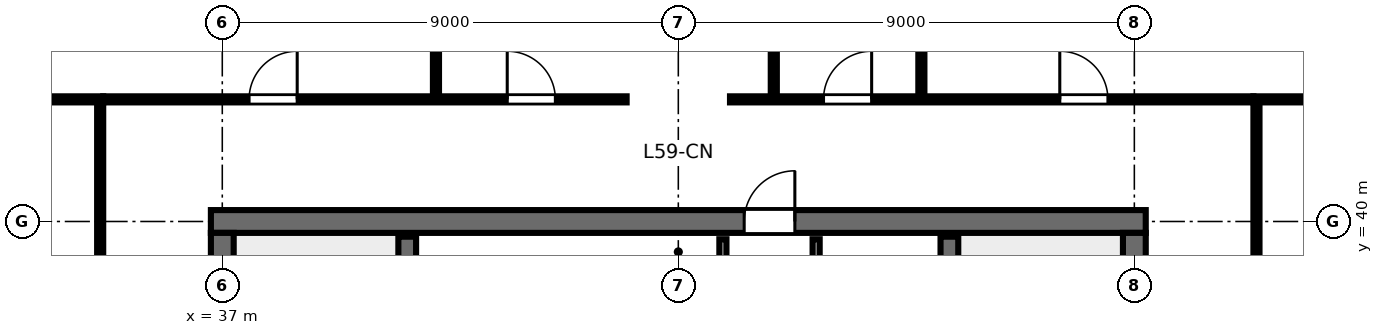
"""IFC4 building model, lengths in metres.
Left out: names, types, materials, properties, quantities, classifications, styles, units other than length and angle.
Written with IfcOpenShell. Run it as: python <this file> out.ifc"""

import sys

from ifc_helpers import new_model, si_unit, direction, frame, frame_2d, origin, place, context, subcontext, project, spatial, rectangle, extrude, element, fill, save


model = new_model("IFC4")
c1 = context("Model", 3, precision=1e-05, world=origin(), true_north=direction((0.0, 1.0)))
c2 = subcontext(c1, "Body", "Model", "MODEL_VIEW")
j1 = project(units=[si_unit("LENGTHUNIT", "METRE"), si_unit("PLANEANGLEUNIT", "RADIAN")], contexts=[c1])
p1 = place(None, origin())
s1 = spatial("IfcSite", under=j1, at=p1, CompositionType="ELEMENT")
p2 = place(p1, origin())
s2 = spatial("IfcBuilding", under=s1, at=p2, CompositionType="ELEMENT")
p3 = place(p2, frame((0.0, 0.0, 223.8)))
s3 = spatial("IfcBuildingStorey", under=s2, at=p3, CompositionType="ELEMENT", Elevation=223.8)
p4 = place(p3, frame((36.775, 40.0, 0.0), z_axis=(0.0, 0.0, 1.0), x_axis=(1.0, 0.0, 0.0)))
e1 = element("IfcWall", 1, at=p4, inside=s3, PredefinedType="SHEAR", context=c2, shape_type="SweptSolid", body=[
    extrude(rectangle(XDim=18.45, YDim=0.45, at=frame_2d((9.225, 0.0))), origin(), (0.0, 0.0, 1.0), 3.36),
])
p5 = place(p4, frame((10.525, 0.0, 0.0)))
e2 = element("IfcOpeningElement", 2, at=p5, cuts=e1, PredefinedType="OPENING", context=c2, shape_type="SweptSolid", body=[
    extrude(rectangle(XDim=1.0, YDim=2.15, at=frame_2d((0.5, 1.075))), frame((0.0, 0.235, 0.0), z_axis=(0.0, -1.0, 0.0), x_axis=(1.0, 0.0, 0.0)), (0.0, 0.0, 1.0), 0.47),
])
p6 = place(p3, frame((37.0, 24.225, 0.0), z_axis=(0.0, 0.0, 1.0), x_axis=(0.0, 1.0, 0.0)))
e3 = element("IfcWall", 3, at=p6, inside=s3, PredefinedType="SHEAR", context=c2, shape_type="SweptSolid", body=[
    extrude(rectangle(XDim=15.55, YDim=0.45, at=frame_2d((7.775, 0.0))), origin(), (0.0, 0.0, 1.0), 3.36),
])
p7 = place(p6, frame((5.3, 0.0, 0.0)))
e4 = element("IfcOpeningElement", 4, at=p7, cuts=e3, PredefinedType="OPENING", context=c2, shape_type="SweptSolid", body=[
    extrude(rectangle(XDim=1.15, YDim=2.15, at=frame_2d((0.575, 1.075))), frame((0.0, 0.235, 0.0), z_axis=(0.0, -1.0, 0.0), x_axis=(1.0, 0.0, 0.0)), (0.0, 0.0, 1.0), 0.47),
])
p8 = place(p3, frame((55.0, 24.225, 0.0), z_axis=(0.0, 0.0, 1.0), x_axis=(0.0, 1.0, 0.0)))
e5 = element("IfcWall", 5, at=p8, inside=s3, PredefinedType="SHEAR", context=c2, shape_type="SweptSolid", body=[
    extrude(rectangle(XDim=15.55, YDim=0.45, at=frame_2d((7.775, 0.0))), origin(), (0.0, 0.0, 1.0), 3.36),
])
p9 = place(p8, frame((5.3, 0.0, 0.0)))
e6 = element("IfcOpeningElement", 6, at=p9, cuts=e5, PredefinedType="OPENING", context=c2, shape_type="SweptSolid", body=[
    extrude(rectangle(XDim=1.15, YDim=2.15, at=frame_2d((0.575, 1.075))), frame((0.0, 0.235, 0.0), z_axis=(0.0, -1.0, 0.0), x_axis=(1.0, 0.0, 0.0)), (0.0, 0.0, 1.0), 0.47),
])
for number, where, z_axis, x_axis in (
    (7, (40.65, 32.0, 0.0), (0.0, 0.0, 1.0), (0.0, 1.0, 0.0)),
    (8, (51.35, 32.0, 0.0), (0.0, 0.0, 1.0), (0.0, 1.0, 0.0)),
):
    element("IfcWall", number, at=place(p3, frame(where, z_axis=z_axis, x_axis=x_axis)), inside=s3, PredefinedType="SHEAR", context=c2, shape_type="SweptSolid", body=[
        extrude(rectangle(XDim=7.7, YDim=0.35, at=frame_2d((3.85, 0.0))), origin(), (0.0, 0.0, 1.0), 3.6),
    ])
p10 = place(p3, frame((46.88, 32.05, 0.0), z_axis=(0.0, 0.0, 1.0), x_axis=(0.0, 1.0, 0.0)))
e9 = element("IfcWall", 9, at=p10, inside=s3, PredefinedType="PARTITIONING", context=c2, shape_type="SweptSolid", body=[
    extrude(rectangle(XDim=7.6, YDim=0.14, at=frame_2d((3.8, 0.0))), origin(), (0.0, 0.0, 1.0), 3.375),
])
p11 = place(p10, frame((3.4, 0.0, 0.0)))
e10 = element("IfcOpeningElement", 10, at=p11, cuts=e9, PredefinedType="OPENING", context=c2, shape_type="SweptSolid", body=[
    extrude(rectangle(XDim=0.95, YDim=2.15, at=frame_2d((0.475, 1.075))), frame((0.0, 0.08, 0.0), z_axis=(0.0, -1.0, 0.0), x_axis=(1.0, 0.0, 0.0)), (0.0, 0.0, 1.0), 0.16),
])
p12 = place(p3, frame((48.72, 32.05, 0.0), z_axis=(0.0, 0.0, 1.0), x_axis=(0.0, 1.0, 0.0)))
e11 = element("IfcWall", 11, at=p12, inside=s3, PredefinedType="PARTITIONING", context=c2, shape_type="SweptSolid", body=[
    extrude(rectangle(XDim=7.6, YDim=0.14, at=frame_2d((3.8, 0.0))), origin(), (0.0, 0.0, 1.0), 3.375),
])
p13 = place(p12, frame((0.8, 0.0, 0.0)))
e12 = element("IfcOpeningElement", 12, at=p13, cuts=e11, PredefinedType="OPENING", context=c2, shape_type="SweptSolid", body=[
    extrude(rectangle(XDim=0.9, YDim=2.15, at=frame_2d((0.45, 1.075))), frame((0.0, 0.08, 0.0), z_axis=(0.0, -1.0, 0.0), x_axis=(1.0, 0.0, 0.0)), (0.0, 0.0, 1.0), 0.16),
])
p14 = place(p12, frame((3.35, 0.0, 0.0)))
e13 = element("IfcOpeningElement", 13, at=p14, cuts=e11, PredefinedType="OPENING", context=c2, shape_type="SweptSolid", body=[
    extrude(rectangle(XDim=0.9, YDim=2.15, at=frame_2d((0.45, 1.075))), frame((0.0, 0.08, 0.0), z_axis=(0.0, -1.0, 0.0), x_axis=(1.0, 0.0, 0.0)), (0.0, 0.0, 1.0), 0.16),
])
p15 = place(p12, frame((5.9, 0.0, 0.0)))
e14 = element("IfcOpeningElement", 14, at=p15, cuts=e11, PredefinedType="OPENING", context=c2, shape_type="SweptSolid", body=[
    extrude(rectangle(XDim=0.92, YDim=2.15, at=frame_2d((0.46, 1.075))), frame((0.0, 0.08, 0.0), z_axis=(0.0, -1.0, 0.0), x_axis=(1.0, 0.0, 0.0)), (0.0, 0.0, 1.0), 0.16),
])
p16 = place(p3, frame((41.217, 42.41, 0.0), z_axis=(0.0, 0.0, 1.0), x_axis=(0.0, 1.0, 0.0)))
e15 = element("IfcWall", 15, at=p16, inside=s3, PredefinedType="PARTITIONING", context=c2, shape_type="SweptSolid", body=[
    extrude(rectangle(XDim=7.137, YDim=0.12, at=frame_2d((3.569, 0.0))), origin(), (0.0, 0.0, 1.0), 2.655),
])
p17 = place(p16, frame((1.4, 0.0, 0.0)))
e16 = element("IfcOpeningElement", 16, at=p17, cuts=e15, PredefinedType="OPENING", context=c2, shape_type="SweptSolid", body=[
    extrude(rectangle(XDim=0.9, YDim=2.15, at=frame_2d((0.45, 1.075))), frame((0.0, 0.07, 0.0), z_axis=(0.0, -1.0, 0.0), x_axis=(1.0, 0.0, 0.0)), (0.0, 0.0, 1.0), 0.14),
])
p18 = place(p3, frame((47.885, 42.41, 0.0), z_axis=(0.0, 0.0, 1.0), x_axis=(0.0, 1.0, 0.0)))
e17 = element("IfcWall", 17, at=p18, inside=s3, PredefinedType="PARTITIONING", context=c2, shape_type="SweptSolid", body=[
    extrude(rectangle(XDim=7.137, YDim=0.12, at=frame_2d((3.569, 0.0))), origin(), (0.0, 0.0, 1.0), 2.655),
])
p19 = place(p18, frame((1.4, 0.0, 0.0)))
e18 = element("IfcOpeningElement", 18, at=p19, cuts=e17, PredefinedType="OPENING", context=c2, shape_type="SweptSolid", body=[
    extrude(rectangle(XDim=0.9, YDim=2.15, at=frame_2d((0.45, 1.075))), frame((0.0, 0.07, 0.0), z_axis=(0.0, -1.0, 0.0), x_axis=(1.0, 0.0, 0.0)), (0.0, 0.0, 1.0), 0.14),
])
p20 = place(p3, frame((50.797, 42.41, 0.0), z_axis=(0.0, 0.0, 1.0), x_axis=(0.0, 1.0, 0.0)))
e19 = element("IfcWall", 19, at=p20, inside=s3, PredefinedType="PARTITIONING", context=c2, shape_type="SweptSolid", body=[
    extrude(rectangle(XDim=7.137, YDim=0.12, at=frame_2d((3.569, 0.0))), origin(), (0.0, 0.0, 1.0), 2.655),
])
p21 = place(p20, frame((1.4, 0.0, 0.0)))
e20 = element("IfcOpeningElement", 20, at=p21, cuts=e19, PredefinedType="OPENING", context=c2, shape_type="SweptSolid", body=[
    extrude(rectangle(XDim=0.9, YDim=2.15, at=frame_2d((0.45, 1.075))), frame((0.0, 0.07, 0.0), z_axis=(0.0, -1.0, 0.0), x_axis=(1.0, 0.0, 0.0)), (0.0, 0.0, 1.0), 0.14),
])
p22 = place(p3, frame((34.65, 42.41, 0.0), z_axis=(0.0, 0.0, 1.0), x_axis=(1.0, 0.0, 0.0)))
e21 = element("IfcWall", 21, at=p22, inside=s3, PredefinedType="PARTITIONING", context=c2, shape_type="SweptSolid", body=[
    extrude(rectangle(XDim=10.33, YDim=0.12, at=frame_2d((5.165, 0.0))), origin(), (0.0, 0.0, 1.0), 2.655),
])
p23 = place(p22, frame((2.878, 0.0, 0.0)))
e22 = element("IfcOpeningElement", 22, at=p23, cuts=e21, PredefinedType="OPENING", context=c2, shape_type="SweptSolid", body=[
    extrude(rectangle(XDim=0.95, YDim=2.15, at=frame_2d((0.475, 1.075))), frame((0.0, 0.07, 0.0), z_axis=(0.0, -1.0, 0.0), x_axis=(1.0, 0.0, 0.0)), (0.0, 0.0, 1.0), 0.14),
])
p24 = place(p22, frame((7.974, 0.0, 0.0)))
e23 = element("IfcOpeningElement", 23, at=p24, cuts=e21, PredefinedType="OPENING", context=c2, shape_type="SweptSolid", body=[
    extrude(rectangle(XDim=0.95, YDim=2.15, at=frame_2d((0.475, 1.075))), frame((0.0, 0.07, 0.0), z_axis=(0.0, -1.0, 0.0), x_axis=(1.0, 0.0, 0.0)), (0.0, 0.0, 1.0), 0.14),
])
p25 = place(p3, frame((47.02, 42.41, 0.0), z_axis=(0.0, 0.0, 1.0), x_axis=(1.0, 0.0, 0.0)))
e24 = element("IfcWall", 24, at=p25, inside=s3, PredefinedType="PARTITIONING", context=c2, shape_type="SweptSolid", body=[
    extrude(rectangle(XDim=10.33, YDim=0.12, at=frame_2d((5.165, 0.0))), origin(), (0.0, 0.0, 1.0), 2.655),
])
p26 = place(p25, frame((1.846, 0.0, 0.0)))
e25 = element("IfcOpeningElement", 25, at=p26, cuts=e24, PredefinedType="OPENING", context=c2, shape_type="SweptSolid", body=[
    extrude(rectangle(XDim=0.95, YDim=2.15, at=frame_2d((0.475, 1.075))), frame((0.0, 0.07, 0.0), z_axis=(0.0, -1.0, 0.0), x_axis=(1.0, 0.0, 0.0)), (0.0, 0.0, 1.0), 0.14),
])
p27 = place(p25, frame((6.509, 0.0, 0.0)))
e26 = element("IfcOpeningElement", 26, at=p27, cuts=e24, PredefinedType="OPENING", context=c2, shape_type="SweptSolid", body=[
    extrude(rectangle(XDim=0.95, YDim=2.15, at=frame_2d((0.475, 1.075))), frame((0.0, 0.07, 0.0), z_axis=(0.0, -1.0, 0.0), x_axis=(1.0, 0.0, 0.0)), (0.0, 0.0, 1.0), 0.14),
])
p28 = place(p3, frame((34.59, 21.65, 0.0), z_axis=(0.0, 0.0, 1.0), x_axis=(0.0, 1.0, 0.0)))
e27 = element("IfcWall", 27, at=p28, inside=s3, PredefinedType="PARTITIONING", context=c2, shape_type="SweptSolid", body=[
    extrude(rectangle(XDim=20.7, YDim=0.12, at=frame_2d((10.35, 0.0))), origin(), (0.0, 0.0, 1.0), 2.655),
])
p29 = place(p28, frame((5.449, 0.0, 0.0)))
e28 = element("IfcOpeningElement", 28, at=p29, cuts=e27, PredefinedType="OPENING", context=c2, shape_type="SweptSolid", body=[
    extrude(rectangle(XDim=0.95, YDim=2.15, at=frame_2d((0.475, 1.075))), frame((0.0, 0.07, 0.0), z_axis=(0.0, -1.0, 0.0), x_axis=(1.0, 0.0, 0.0)), (0.0, 0.0, 1.0), 0.14),
])
p30 = place(p28, frame((15.599, 0.0, 0.0)))
e29 = element("IfcOpeningElement", 29, at=p30, cuts=e27, PredefinedType="OPENING", context=c2, shape_type="SweptSolid", body=[
    extrude(rectangle(XDim=0.95, YDim=2.15, at=frame_2d((0.475, 1.075))), frame((0.0, 0.07, 0.0), z_axis=(0.0, -1.0, 0.0), x_axis=(1.0, 0.0, 0.0)), (0.0, 0.0, 1.0), 0.14),
])
p31 = place(p3, frame((57.41, 21.65, 0.0), z_axis=(0.0, 0.0, 1.0), x_axis=(0.0, 1.0, 0.0)))
e30 = element("IfcWall", 30, at=p31, inside=s3, PredefinedType="PARTITIONING", context=c2, shape_type="SweptSolid", body=[
    extrude(rectangle(XDim=20.7, YDim=0.12, at=frame_2d((10.35, 0.0))), origin(), (0.0, 0.0, 1.0), 2.655),
])
p32 = place(p31, frame((9.875, 0.0, 0.0)))
e31 = element("IfcOpeningElement", 31, at=p32, cuts=e30, PredefinedType="OPENING", context=c2, shape_type="SweptSolid", body=[
    extrude(rectangle(XDim=0.95, YDim=2.15, at=frame_2d((0.475, 1.075))), frame((0.0, 0.07, 0.0), z_axis=(0.0, -1.0, 0.0), x_axis=(1.0, 0.0, 0.0)), (0.0, 0.0, 1.0), 0.14),
])
for number, where, z_axis, x_axis in (
    (32, (34.65, 42.41, 0.0), (0.0, 0.0, 1.0), (-1.0, 0.0, 0.0)),
    (33, (57.35, 42.41, 0.0), (0.0, 0.0, 1.0), (1.0, 0.0, 0.0)),
):
    element("IfcWall", number, at=place(p3, frame(where, z_axis=z_axis, x_axis=x_axis)), inside=s3, PredefinedType="PARTITIONING", context=c2, shape_type="SweptSolid", body=[
        extrude(rectangle(XDim=8.243, YDim=0.12, at=frame_2d((4.121, 0.0))), origin(), (0.0, 0.0, 1.0), 2.655),
    ])
p33 = place(p5, origin())
e34 = element("IfcDoor", 34, at=p33, inside=s3, OperationType="SINGLE_SWING_RIGHT", PredefinedType="DOOR", context=c2, shape_type="SweptSolid", body=[
    extrude(rectangle(XDim=1.0, YDim=2.15, at=frame_2d((0.5, 1.075))), frame((0.0, 0.025, 0.0), z_axis=(0.0, -1.0, 0.0), x_axis=(1.0, 0.0, 0.0)), (0.0, 0.0, 1.0), 0.05),
])
fill(e2, e34)
p34 = place(p23, origin())
e35 = element("IfcDoor", 35, at=p34, inside=s3, OperationType="SINGLE_SWING_RIGHT", PredefinedType="DOOR", context=c2, shape_type="SweptSolid", body=[
    extrude(rectangle(XDim=0.95, YDim=2.15, at=frame_2d((0.475, 1.075))), frame((0.0, 0.025, 0.0), z_axis=(0.0, -1.0, 0.0), x_axis=(1.0, 0.0, 0.0)), (0.0, 0.0, 1.0), 0.05),
])
fill(e22, e35)
p35 = place(p24, origin())
e36 = element("IfcDoor", 36, at=p35, inside=s3, OperationType="SINGLE_SWING_LEFT", PredefinedType="DOOR", context=c2, shape_type="SweptSolid", body=[
    extrude(rectangle(XDim=0.95, YDim=2.15, at=frame_2d((0.475, 1.075))), frame((0.0, 0.025, 0.0), z_axis=(0.0, -1.0, 0.0), x_axis=(1.0, 0.0, 0.0)), (0.0, 0.0, 1.0), 0.05),
])
fill(e23, e36)
p36 = place(p26, origin())
e37 = element("IfcDoor", 37, at=p36, inside=s3, OperationType="SINGLE_SWING_RIGHT", PredefinedType="DOOR", context=c2, shape_type="SweptSolid", body=[
    extrude(rectangle(XDim=0.95, YDim=2.15, at=frame_2d((0.475, 1.075))), frame((0.0, 0.025, 0.0), z_axis=(0.0, -1.0, 0.0), x_axis=(1.0, 0.0, 0.0)), (0.0, 0.0, 1.0), 0.05),
])
fill(e25, e37)
p37 = place(p27, origin())
e38 = element("IfcDoor", 38, at=p37, inside=s3, OperationType="SINGLE_SWING_LEFT", PredefinedType="DOOR", context=c2, shape_type="SweptSolid", body=[
    extrude(rectangle(XDim=0.95, YDim=2.15, at=frame_2d((0.475, 1.075))), frame((0.0, 0.025, 0.0), z_axis=(0.0, -1.0, 0.0), x_axis=(1.0, 0.0, 0.0)), (0.0, 0.0, 1.0), 0.05),
])
fill(e26, e38)
save(model, sys.argv[1])
